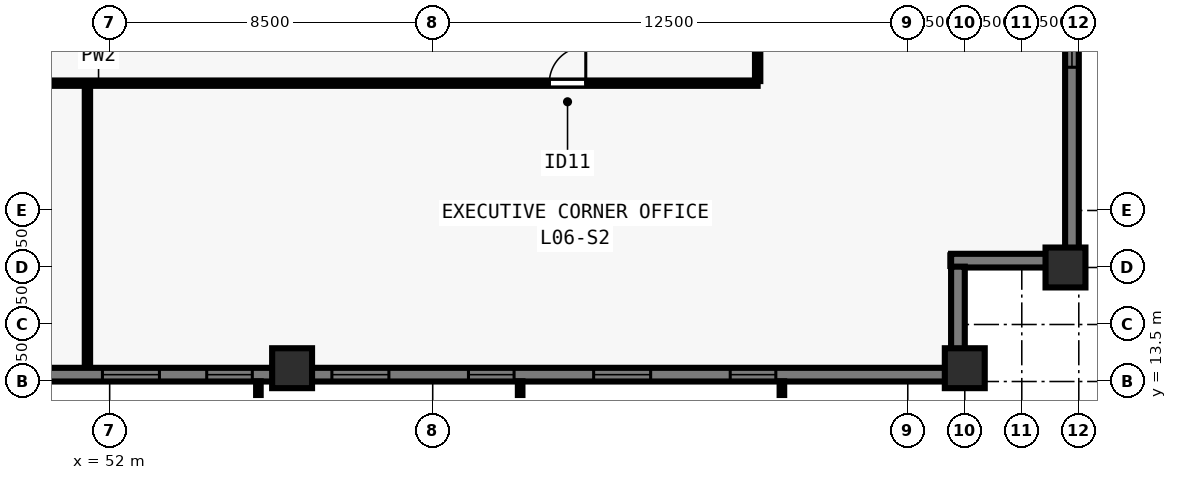
"""IFC4 building model, lengths in metres.
Left out: names, types, materials, properties, quantities, classifications, styles, units other than length and angle.
Written with IfcOpenShell. Run it as: python <this file> out.ifc"""

import sys

from ifc_helpers import new_model, si_unit, direction, frame, frame_2d, origin, origin_2d, place, context, subcontext, project, spatial, rectangle, extrude, element, fill, save


model = new_model("IFC4")
c1 = context("Model", 3, precision=1e-05, world=origin(), true_north=direction((0.0, 1.0)))
c2 = subcontext(c1, "Body", "Model", "MODEL_VIEW")
j1 = project(units=[si_unit("LENGTHUNIT", "METRE"), si_unit("PLANEANGLEUNIT", "RADIAN")], contexts=[c1])
p1 = place(None, origin())
s1 = spatial("IfcSite", under=j1, at=p1, CompositionType="ELEMENT")
p2 = place(p1, origin())
s2 = spatial("IfcBuilding", under=s1, at=p2, CompositionType="ELEMENT")
p3 = place(p2, frame((0.0, 0.0, 27.0)))
s3 = spatial("IfcBuildingStorey", under=s2, at=p3, CompositionType="ELEMENT", Elevation=27.0)
for number, where, z_axis, x_axis in (
    (1, (56.8, 13.85, 0.0), (0.0, 0.0, 1.0), (1.0, 0.0, 0.0)),
    (2, (74.5, 13.85, 0.0), (0.0, 0.0, 1.0), (1.0, 0.0, 0.0)),
    (3, (77.15, 16.5, 0.0), (0.0, 0.0, 1.0), (0.0, 1.0, 0.0)),
):
    element("IfcColumn", number, at=place(p3, frame(where, z_axis=z_axis, x_axis=x_axis)), inside=s3, PredefinedType="COLUMN", context=c2, shape_type="SweptSolid", body=[
        extrude(rectangle(XDim=1.05, YDim=1.05, at=origin_2d()), origin(), (0.0, 0.0, 1.0), 3.5),
    ])
p4 = place(p3, frame((77.32, 61.5, 0.0), z_axis=(0.0, 0.0, 1.0), x_axis=(0.0, -1.0, 0.0)))
e4 = element("IfcWall", 4, at=p4, inside=s3, PredefinedType="SOLIDWALL", context=c2, shape_type="SweptSolid", body=[
    extrude(rectangle(XDim=44.662, YDim=0.36, at=frame_2d((22.331, 0.0))), origin(), (0.0, 0.0, 1.0), 3.28),
])
p5 = place(p4, frame((4.93, 0.0, 0.8)))
e5 = element("IfcOpeningElement", 5, at=p5, cuts=e4, PredefinedType="OPENING", context=c2, shape_type="SweptSolid", body=[
    extrude(rectangle(XDim=1.2, YDim=1.544, at=frame_2d((0.6, 0.772))), frame((0.0, 0.19, 0.0), z_axis=(0.0, -1.0, 0.0), x_axis=(1.0, 0.0, 0.0)), (0.0, 0.0, 1.0), 0.38),
])
p6 = place(p4, frame((8.14, 0.0, 0.8)))
e6 = element("IfcOpeningElement", 6, at=p6, cuts=e4, PredefinedType="OPENING", context=c2, shape_type="SweptSolid", body=[
    extrude(rectangle(XDim=1.5, YDim=1.544, at=frame_2d((0.75, 0.772))), frame((0.0, 0.19, 0.0), z_axis=(0.0, -1.0, 0.0), x_axis=(1.0, 0.0, 0.0)), (0.0, 0.0, 1.0), 0.38),
])
p7 = place(p4, frame((11.65, 0.0, 0.8)))
e7 = element("IfcOpeningElement", 7, at=p7, cuts=e4, PredefinedType="OPENING", context=c2, shape_type="SweptSolid", body=[
    extrude(rectangle(XDim=1.2, YDim=1.544, at=frame_2d((0.6, 0.772))), frame((0.0, 0.19, 0.0), z_axis=(0.0, -1.0, 0.0), x_axis=(1.0, 0.0, 0.0)), (0.0, 0.0, 1.0), 0.38),
])
p8 = place(p4, frame((14.861, 0.0, 0.8)))
e8 = element("IfcOpeningElement", 8, at=p8, cuts=e4, PredefinedType="OPENING", context=c2, shape_type="SweptSolid", body=[
    extrude(rectangle(XDim=1.5, YDim=1.544, at=frame_2d((0.75, 0.772))), frame((0.0, 0.19, 0.0), z_axis=(0.0, -1.0, 0.0), x_axis=(1.0, 0.0, 0.0)), (0.0, 0.0, 1.0), 0.38),
])
p9 = place(p4, frame((18.821, 0.0, 0.8)))
e9 = element("IfcOpeningElement", 9, at=p9, cuts=e4, PredefinedType="OPENING", context=c2, shape_type="SweptSolid", body=[
    extrude(rectangle(XDim=1.2, YDim=1.544, at=frame_2d((0.6, 0.772))), frame((0.0, 0.19, 0.0), z_axis=(0.0, -1.0, 0.0), x_axis=(1.0, 0.0, 0.0)), (0.0, 0.0, 1.0), 0.38),
])
p10 = place(p4, frame((22.431, 0.0, 0.8)))
e10 = element("IfcOpeningElement", 10, at=p10, cuts=e4, PredefinedType="OPENING", context=c2, shape_type="SweptSolid", body=[
    extrude(rectangle(XDim=1.5, YDim=1.544, at=frame_2d((0.75, 0.772))), frame((0.0, 0.19, 0.0), z_axis=(0.0, -1.0, 0.0), x_axis=(1.0, 0.0, 0.0)), (0.0, 0.0, 1.0), 0.38),
])
p11 = place(p4, frame((25.091, 0.0, 0.8)))
e11 = element("IfcOpeningElement", 11, at=p11, cuts=e4, PredefinedType="OPENING", context=c2, shape_type="SweptSolid", body=[
    extrude(rectangle(XDim=1.2, YDim=1.544, at=frame_2d((0.6, 0.772))), frame((0.0, 0.19, 0.0), z_axis=(0.0, -1.0, 0.0), x_axis=(1.0, 0.0, 0.0)), (0.0, 0.0, 1.0), 0.38),
])
p12 = place(p4, frame((28.302, 0.0, 0.8)))
e12 = element("IfcOpeningElement", 12, at=p12, cuts=e4, PredefinedType="OPENING", context=c2, shape_type="SweptSolid", body=[
    extrude(rectangle(XDim=1.5, YDim=1.544, at=frame_2d((0.75, 0.772))), frame((0.0, 0.19, 0.0), z_axis=(0.0, -1.0, 0.0), x_axis=(1.0, 0.0, 0.0)), (0.0, 0.0, 1.0), 0.38),
])
p13 = place(p4, frame((31.812, 0.0, 0.8)))
e13 = element("IfcOpeningElement", 13, at=p13, cuts=e4, PredefinedType="OPENING", context=c2, shape_type="SweptSolid", body=[
    extrude(rectangle(XDim=1.2, YDim=1.544, at=frame_2d((0.6, 0.772))), frame((0.0, 0.19, 0.0), z_axis=(0.0, -1.0, 0.0), x_axis=(1.0, 0.0, 0.0)), (0.0, 0.0, 1.0), 0.38),
])
p14 = place(p4, frame((35.022, 0.0, 0.8)))
e14 = element("IfcOpeningElement", 14, at=p14, cuts=e4, PredefinedType="OPENING", context=c2, shape_type="SweptSolid", body=[
    extrude(rectangle(XDim=1.5, YDim=1.544, at=frame_2d((0.75, 0.772))), frame((0.0, 0.19, 0.0), z_axis=(0.0, -1.0, 0.0), x_axis=(1.0, 0.0, 0.0)), (0.0, 0.0, 1.0), 0.38),
])
p15 = place(p4, frame((38.532, 0.0, 0.8)))
e15 = element("IfcOpeningElement", 15, at=p15, cuts=e4, PredefinedType="OPENING", context=c2, shape_type="SweptSolid", body=[
    extrude(rectangle(XDim=1.2, YDim=1.544, at=frame_2d((0.6, 0.772))), frame((0.0, 0.19, 0.0), z_axis=(0.0, -1.0, 0.0), x_axis=(1.0, 0.0, 0.0)), (0.0, 0.0, 1.0), 0.38),
])
p16 = place(p3, frame((77.5, 16.68, 0.0), z_axis=(0.0, 0.0, 1.0), x_axis=(-1.0, 0.0, 0.0)))
e16 = element("IfcWall", 16, at=p16, inside=s3, PredefinedType="SOLIDWALL", context=c2, shape_type="SweptSolid", body=[
    extrude(rectangle(XDim=3.36, YDim=0.36, at=frame_2d((1.68, 0.0))), origin(), (0.0, 0.0, 1.0), 3.28),
])
p17 = place(p3, frame((74.32, 16.522, 0.0), z_axis=(0.0, 0.0, 1.0), x_axis=(0.0, -1.0, 0.0)))
e17 = element("IfcWall", 17, at=p17, inside=s3, PredefinedType="SOLIDWALL", context=c2, shape_type="SweptSolid", body=[
    extrude(rectangle(XDim=2.684, YDim=0.36, at=frame_2d((1.342, 0.0))), origin(), (0.0, 0.0, 1.0), 3.28),
])
p18 = place(p3, frame((74.5, 13.68, 0.0), z_axis=(0.0, 0.0, 1.0), x_axis=(-1.0, 0.0, 0.0)))
e18 = element("IfcWall", 18, at=p18, inside=s3, PredefinedType="SOLIDWALL", context=c2, shape_type="SweptSolid", body=[
    extrude(rectangle(XDim=28.362, YDim=0.36, at=frame_2d((14.181, 0.0))), origin(), (0.0, 0.0, 1.0), 3.28),
])
p19 = place(p18, frame((4.972, 0.0, 0.8)))
e19 = element("IfcOpeningElement", 19, at=p19, cuts=e18, PredefinedType="OPENING", context=c2, shape_type="SweptSolid", body=[
    extrude(rectangle(XDim=1.2, YDim=1.544, at=frame_2d((0.6, 0.772))), frame((0.0, 0.19, 0.0), z_axis=(0.0, -1.0, 0.0), x_axis=(1.0, 0.0, 0.0)), (0.0, 0.0, 1.0), 0.38),
])
p20 = place(p18, frame((8.265, 0.0, 0.8)))
e20 = element("IfcOpeningElement", 20, at=p20, cuts=e18, PredefinedType="OPENING", context=c2, shape_type="SweptSolid", body=[
    extrude(rectangle(XDim=1.5, YDim=1.544, at=frame_2d((0.75, 0.772))), frame((0.0, 0.19, 0.0), z_axis=(0.0, -1.0, 0.0), x_axis=(1.0, 0.0, 0.0)), (0.0, 0.0, 1.0), 0.38),
])
p21 = place(p18, frame((11.859, 0.0, 0.8)))
e21 = element("IfcOpeningElement", 21, at=p21, cuts=e18, PredefinedType="OPENING", context=c2, shape_type="SweptSolid", body=[
    extrude(rectangle(XDim=1.2, YDim=1.544, at=frame_2d((0.6, 0.772))), frame((0.0, 0.19, 0.0), z_axis=(0.0, -1.0, 0.0), x_axis=(1.0, 0.0, 0.0)), (0.0, 0.0, 1.0), 0.38),
])
p22 = place(p18, frame((15.153, 0.0, 0.8)))
e22 = element("IfcOpeningElement", 22, at=p22, cuts=e18, PredefinedType="OPENING", context=c2, shape_type="SweptSolid", body=[
    extrude(rectangle(XDim=1.5, YDim=1.544, at=frame_2d((0.75, 0.772))), frame((0.0, 0.19, 0.0), z_axis=(0.0, -1.0, 0.0), x_axis=(1.0, 0.0, 0.0)), (0.0, 0.0, 1.0), 0.38),
])
p23 = place(p18, frame((18.747, 0.0, 0.8)))
e23 = element("IfcOpeningElement", 23, at=p23, cuts=e18, PredefinedType="OPENING", context=c2, shape_type="SweptSolid", body=[
    extrude(rectangle(XDim=1.2, YDim=1.544, at=frame_2d((0.6, 0.772))), frame((0.0, 0.19, 0.0), z_axis=(0.0, -1.0, 0.0), x_axis=(1.0, 0.0, 0.0)), (0.0, 0.0, 1.0), 0.38),
])
p24 = place(p18, frame((21.19, 0.0, 0.8)))
e24 = element("IfcOpeningElement", 24, at=p24, cuts=e18, PredefinedType="OPENING", context=c2, shape_type="SweptSolid", body=[
    extrude(rectangle(XDim=1.5, YDim=1.544, at=frame_2d((0.75, 0.772))), frame((0.0, 0.19, 0.0), z_axis=(0.0, -1.0, 0.0), x_axis=(1.0, 0.0, 0.0)), (0.0, 0.0, 1.0), 0.38),
])
p25 = place(p3, frame((34.95, 21.35, 0.0), z_axis=(0.0, 0.0, 1.0), x_axis=(1.0, 0.0, 0.0)))
e25 = element("IfcWall", 25, at=p25, inside=s3, PredefinedType="PARTITIONING", context=c2, shape_type="SweptSolid", body=[
    extrude(rectangle(XDim=34.1, YDim=0.14, at=frame_2d((17.05, 0.0))), origin(), (0.0, 0.0, 1.0), 3.28),
])
p26 = place(p25, frame((3.938, 0.0, 0.0)))
e26 = element("IfcOpeningElement", 26, at=p26, cuts=e25, PredefinedType="OPENING", context=c2, shape_type="SweptSolid", body=[
    extrude(rectangle(XDim=0.96, YDim=2.12, at=frame_2d((0.48, 1.06))), frame((0.0, 0.08, 0.0), z_axis=(0.0, -1.0, 0.0), x_axis=(1.0, 0.0, 0.0)), (0.0, 0.0, 1.0), 0.16),
])
p27 = place(p25, frame((28.617, 0.0, 0.0)))
e27 = element("IfcOpeningElement", 27, at=p27, cuts=e25, PredefinedType="OPENING", context=c2, shape_type="SweptSolid", body=[
    extrude(rectangle(XDim=0.96, YDim=2.12, at=frame_2d((0.48, 1.06))), frame((0.0, 0.08, 0.0), z_axis=(0.0, -1.0, 0.0), x_axis=(1.0, 0.0, 0.0)), (0.0, 0.0, 1.0), 0.16),
])
p28 = place(p3, frame((69.05, 21.405, 0.0), z_axis=(0.0, 0.0, 1.0), x_axis=(0.0, 1.0, 0.0)))
e28 = element("IfcWall", 28, at=p28, inside=s3, PredefinedType="PARTITIONING", context=c2, shape_type="SweptSolid", body=[
    extrude(rectangle(XDim=35.19, YDim=0.14, at=frame_2d((17.595, 0.0))), origin(), (0.0, 0.0, 1.0), 3.28),
])
p29 = place(p28, frame((8.545, 0.0, 0.0)))
e29 = element("IfcOpeningElement", 29, at=p29, cuts=e28, PredefinedType="OPENING", context=c2, shape_type="SweptSolid", body=[
    extrude(rectangle(XDim=0.96, YDim=2.12, at=frame_2d((0.48, 1.06))), frame((0.0, 0.08, 0.0), z_axis=(0.0, -1.0, 0.0), x_axis=(1.0, 0.0, 0.0)), (0.0, 0.0, 1.0), 0.16),
])
p30 = place(p28, frame((26.095, 0.0, 0.0)))
e30 = element("IfcOpeningElement", 30, at=p30, cuts=e28, PredefinedType="OPENING", context=c2, shape_type="SweptSolid", body=[
    extrude(rectangle(XDim=0.96, YDim=2.12, at=frame_2d((0.48, 1.06))), frame((0.0, 0.08, 0.0), z_axis=(0.0, -1.0, 0.0), x_axis=(1.0, 0.0, 0.0)), (0.0, 0.0, 1.0), 0.16),
])
p31 = place(p3, frame((51.415, 13.92, 0.0), z_axis=(0.0, 0.0, 1.0), x_axis=(0.0, 1.0, 0.0)))
e31 = element("IfcWall", 31, at=p31, inside=s3, PredefinedType="PARTITIONING", context=c2, shape_type="SweptSolid", body=[
    extrude(rectangle(XDim=7.33, YDim=0.14, at=frame_2d((3.665, 0.0))), origin(), (0.0, 0.0, 1.0), 2.849),
])
p32 = place(p15, origin())
e32 = element("IfcWindow", 32, at=p32, inside=s3, PartitioningType="SINGLE_PANEL", PredefinedType="WINDOW", context=c2, shape_type="SweptSolid", body=[
    extrude(rectangle(XDim=1.2, YDim=1.544, at=frame_2d((0.6, 0.772))), frame((0.0, -0.05, 0.0), z_axis=(0.0, -1.0, 0.0), x_axis=(1.0, 0.0, 0.0)), (0.0, 0.0, 1.0), 0.06),
])
fill(e15, e32)
p33 = place(p19, origin())
e33 = element("IfcWindow", 33, at=p33, inside=s3, PartitioningType="SINGLE_PANEL", PredefinedType="WINDOW", context=c2, shape_type="SweptSolid", body=[
    extrude(rectangle(XDim=1.2, YDim=1.544, at=frame_2d((0.6, 0.772))), frame((0.0, -0.05, 0.0), z_axis=(0.0, -1.0, 0.0), x_axis=(1.0, 0.0, 0.0)), (0.0, 0.0, 1.0), 0.06),
])
fill(e19, e33)
p34 = place(p20, origin())
e34 = element("IfcWindow", 34, at=p34, inside=s3, PartitioningType="SINGLE_PANEL", PredefinedType="WINDOW", context=c2, shape_type="SweptSolid", body=[
    extrude(rectangle(XDim=1.5, YDim=1.544, at=frame_2d((0.75, 0.772))), frame((0.0, -0.05, 0.0), z_axis=(0.0, -1.0, 0.0), x_axis=(1.0, 0.0, 0.0)), (0.0, 0.0, 1.0), 0.06),
])
fill(e20, e34)
p35 = place(p21, origin())
e35 = element("IfcWindow", 35, at=p35, inside=s3, PartitioningType="SINGLE_PANEL", PredefinedType="WINDOW", context=c2, shape_type="SweptSolid", body=[
    extrude(rectangle(XDim=1.2, YDim=1.544, at=frame_2d((0.6, 0.772))), frame((0.0, -0.05, 0.0), z_axis=(0.0, -1.0, 0.0), x_axis=(1.0, 0.0, 0.0)), (0.0, 0.0, 1.0), 0.06),
])
fill(e21, e35)
p36 = place(p22, origin())
e36 = element("IfcWindow", 36, at=p36, inside=s3, PartitioningType="SINGLE_PANEL", PredefinedType="WINDOW", context=c2, shape_type="SweptSolid", body=[
    extrude(rectangle(XDim=1.5, YDim=1.544, at=frame_2d((0.75, 0.772))), frame((0.0, -0.05, 0.0), z_axis=(0.0, -1.0, 0.0), x_axis=(1.0, 0.0, 0.0)), (0.0, 0.0, 1.0), 0.06),
])
fill(e22, e36)
p37 = place(p23, origin())
e37 = element("IfcWindow", 37, at=p37, inside=s3, PartitioningType="SINGLE_PANEL", PredefinedType="WINDOW", context=c2, shape_type="SweptSolid", body=[
    extrude(rectangle(XDim=1.2, YDim=1.544, at=frame_2d((0.6, 0.772))), frame((0.0, -0.05, 0.0), z_axis=(0.0, -1.0, 0.0), x_axis=(1.0, 0.0, 0.0)), (0.0, 0.0, 1.0), 0.06),
])
fill(e23, e37)
p38 = place(p24, origin())
e38 = element("IfcWindow", 38, at=p38, inside=s3, PartitioningType="SINGLE_PANEL", PredefinedType="WINDOW", context=c2, shape_type="SweptSolid", body=[
    extrude(rectangle(XDim=1.5, YDim=1.544, at=frame_2d((0.75, 0.772))), frame((0.0, -0.05, 0.0), z_axis=(0.0, -1.0, 0.0), x_axis=(1.0, 0.0, 0.0)), (0.0, 0.0, 1.0), 0.06),
])
fill(e24, e38)
p39 = place(p27, origin())
e39 = element("IfcDoor", 39, at=p39, inside=s3, OperationType="SINGLE_SWING_RIGHT", PredefinedType="DOOR", context=c2, shape_type="SweptSolid", body=[
    extrude(rectangle(XDim=0.96, YDim=2.12, at=frame_2d((0.48, 1.06))), frame((0.0, 0.025, 0.0), z_axis=(0.0, -1.0, 0.0), x_axis=(1.0, 0.0, 0.0)), (0.0, 0.0, 1.0), 0.05),
])
fill(e27, e39)
save(model, sys.argv[1])
